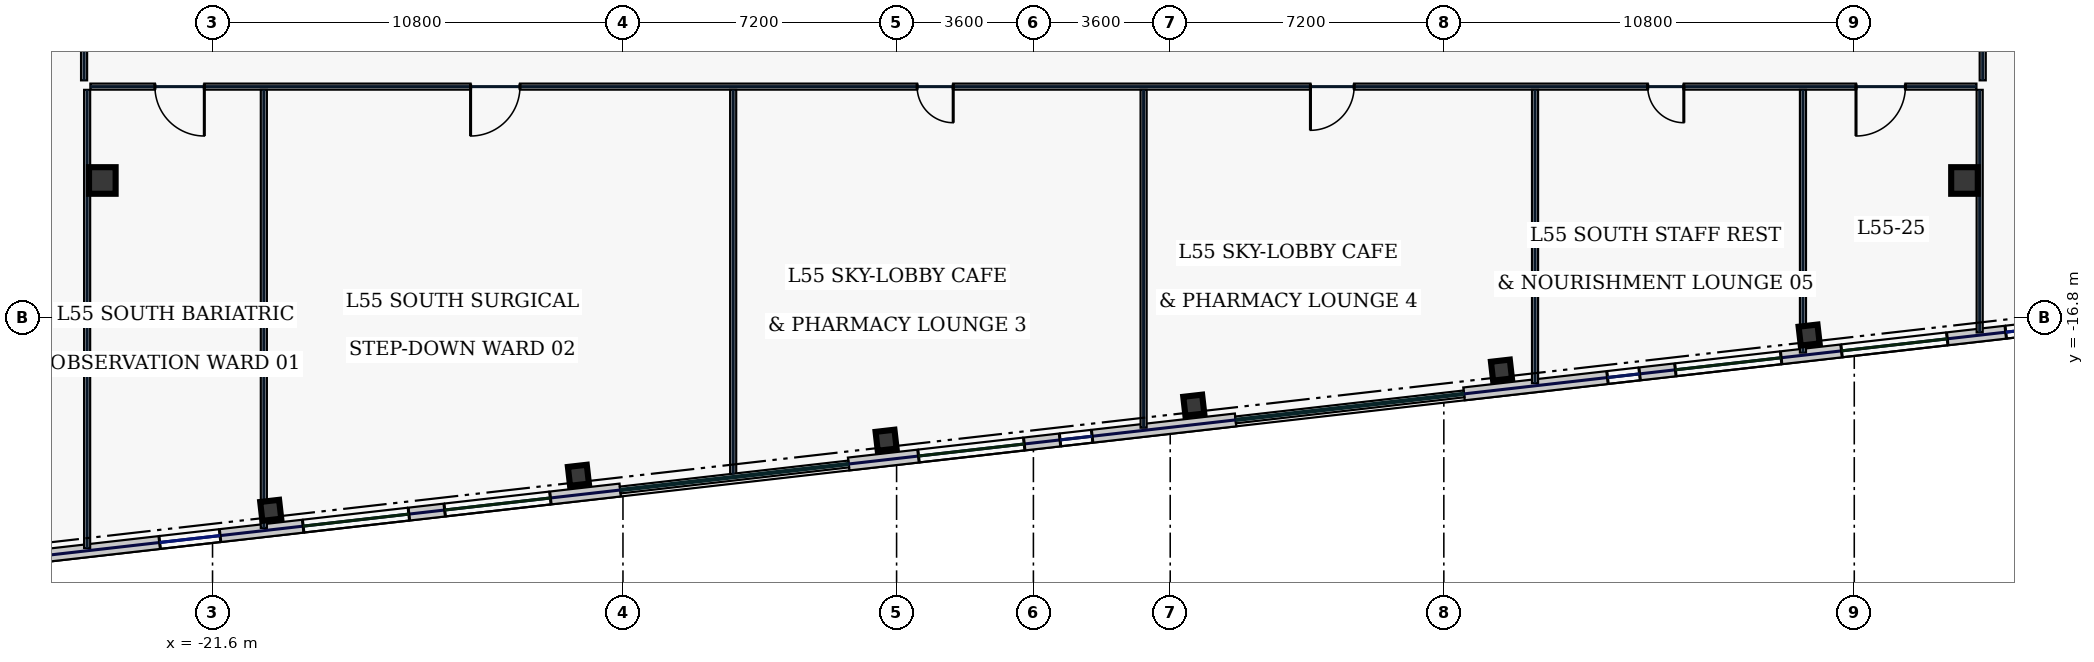
"""IFC4 building model, lengths in metres.
Left out: names, types, materials, properties, quantities, classifications, styles, units other than length and angle.
Written with IfcOpenShell. Run it as: python <this file> out.ifc"""

import sys

from ifc_helpers import new_model, si_unit, direction, frame, frame_2d, origin, origin_2d, place, context, subcontext, project, spatial, rectangle, hollow_rectangle, extrude, element, fill, save


model = new_model("IFC4")
c1 = context("Model", 3, precision=1e-05, world=origin(), true_north=direction((0.0, 1.0)))
c2 = subcontext(c1, "Body", "Model", "MODEL_VIEW")
j1 = project(units=[si_unit("LENGTHUNIT", "METRE"), si_unit("PLANEANGLEUNIT", "RADIAN")], contexts=[c1])
p1 = place(None, origin())
s1 = spatial("IfcSite", under=j1, at=p1, CompositionType="ELEMENT")
p2 = place(p1, origin())
s2 = spatial("IfcBuilding", under=s1, at=p2, CompositionType="ELEMENT")
p3 = place(p2, frame((0.0, 0.0, 238.2)))
s3 = spatial("IfcBuildingStorey", under=s2, at=p3, CompositionType="ELEMENT", Elevation=238.2)
for number, where, z_axis, x_axis in (
    (1, (-24.5, -13.2, 0.0), (0.0, 0.0, 1.0), (1.0, 0.0, 0.0)),
    (2, (24.5, -13.2, 0.0), (0.0, 0.0, 1.0), (1.0, 0.0, 0.0)),
):
    element("IfcColumn", number, at=place(p3, frame(where, z_axis=z_axis, x_axis=x_axis)), inside=s3, PredefinedType="COLUMN", context=c2, shape_type="SweptSolid", body=[
        extrude(hollow_rectangle(XDim=0.7, YDim=0.7, WallThickness=0.032, at=origin_2d()), origin(), (0.0, 0.0, 1.0), 4.54),
    ])
for number, where, z_axis, x_axis in (
    (3, (-20.069, -21.88, 0.0), (0.0, 0.0, 1.0), (0.994, 0.113, 0.0)),
    (4, (-11.972, -20.958, 0.0), (0.0, 0.0, 1.0), (0.994, 0.113, 0.0)),
    (5, (-3.876, -20.035, 0.0), (0.0, 0.0, 1.0), (0.994, 0.113, 0.0)),
    (6, (4.22, -19.113, 0.0), (0.0, 0.0, 1.0), (0.994, 0.113, 0.0)),
    (7, (12.316, -18.19, 0.0), (0.0, 0.0, 1.0), (0.994, 0.113, 0.0)),
    (8, (20.412, -17.268, 0.0), (0.0, 0.0, 1.0), (0.994, 0.113, 0.0)),
):
    element("IfcColumn", number, at=place(p3, frame(where, z_axis=z_axis, x_axis=x_axis)), inside=s3, PredefinedType="COLUMN", context=c2, shape_type="SweptSolid", body=[
        extrude(hollow_rectangle(XDim=0.5, YDim=0.5, WallThickness=0.025, at=origin_2d()), origin(), (0.0, 0.0, 1.0), 4.54),
    ])
p4 = place(p3, frame((-28.783, -23.386, 0.0), z_axis=(0.0, 0.0, 1.0), x_axis=(0.993571855431, 0.113203215925, 0.0)))
e9 = element("IfcWall", 9, at=p4, inside=s3, PredefinedType="STANDARD", context=c2, shape_type="SweptSolid", body=[
    extrude(rectangle(XDim=18.028, YDim=0.34, at=frame_2d((9.014, 0.0))), origin(), (0.0, 0.0, 1.0), 4.54),
])
p5 = place(p4, frame((1.48, 0.0, 0.9)))
e10 = element("IfcOpeningElement", 10, at=p5, cuts=e9, PredefinedType="OPENING", context=c2, shape_type="SweptSolid", body=[
    extrude(rectangle(XDim=0.85, YDim=1.85, at=frame_2d((0.425, 0.925))), frame((0.0, 0.18, 0.0), z_axis=(0.0, -1.0, 0.0), x_axis=(1.0, 0.0, 0.0)), (0.0, 0.0, 1.0), 0.36),
])
p6 = place(p4, frame((5.829, 0.0, 0.22)))
e11 = element("IfcOpeningElement", 11, at=p6, cuts=e9, PredefinedType="OPENING", context=c2, shape_type="SweptSolid", body=[
    extrude(rectangle(XDim=1.6, YDim=1.2, at=frame_2d((0.8, 0.6))), frame((0.0, 0.18, 0.0), z_axis=(0.0, -1.0, 0.0), x_axis=(1.0, 0.0, 0.0)), (0.0, 0.0, 1.0), 0.36),
])
p7 = place(p4, frame((9.629, 0.0, 0.9)))
e12 = element("IfcOpeningElement", 12, at=p7, cuts=e9, PredefinedType="OPENING", context=c2, shape_type="SweptSolid", body=[
    extrude(rectangle(XDim=2.8, YDim=1.95, at=frame_2d((1.4, 0.975))), frame((0.0, 0.18, 0.0), z_axis=(0.0, -1.0, 0.0), x_axis=(1.0, 0.0, 0.0)), (0.0, 0.0, 1.0), 0.36),
])
p8 = place(p4, frame((13.377, 0.0, 0.9)))
e13 = element("IfcOpeningElement", 13, at=p8, cuts=e9, PredefinedType="OPENING", context=c2, shape_type="SweptSolid", body=[
    extrude(rectangle(XDim=2.8, YDim=1.95, at=frame_2d((1.4, 0.975))), frame((0.0, 0.18, 0.0), z_axis=(0.0, -1.0, 0.0), x_axis=(1.0, 0.0, 0.0)), (0.0, 0.0, 1.0), 0.36),
])
p9 = place(p3, frame((-4.862, -20.661, 0.0), z_axis=(0.0, 0.0, 1.0), x_axis=(0.993570162731, 0.113218071575, 0.0)))
e14 = element("IfcWall", 14, at=p9, inside=s3, PredefinedType="STANDARD", context=c2, shape_type="SweptSolid", body=[
    extrude(rectangle(XDim=10.249, YDim=0.34, at=frame_2d((5.125, 0.0))), origin(), (0.0, 0.0, 1.0), 4.54),
])
p10 = place(p9, frame((1.85, 0.0, 0.9)))
e15 = element("IfcOpeningElement", 15, at=p10, cuts=e14, PredefinedType="OPENING", context=c2, shape_type="SweptSolid", body=[
    extrude(rectangle(XDim=2.8, YDim=1.95, at=frame_2d((1.4, 0.975))), frame((0.0, 0.18, 0.0), z_axis=(0.0, -1.0, 0.0), x_axis=(1.0, 0.0, 0.0)), (0.0, 0.0, 1.0), 0.36),
])
p11 = place(p9, frame((5.599, 0.0, 0.9)))
e16 = element("IfcOpeningElement", 16, at=p11, cuts=e14, PredefinedType="OPENING", context=c2, shape_type="SweptSolid", body=[
    extrude(rectangle(XDim=0.85, YDim=1.85, at=frame_2d((0.425, 0.925))), frame((0.0, 0.18, 0.0), z_axis=(0.0, -1.0, 0.0), x_axis=(1.0, 0.0, 0.0)), (0.0, 0.0, 1.0), 0.36),
])
p12 = place(p3, frame((11.331, -18.816, 0.0), z_axis=(0.0, 0.0, 1.0), x_axis=(0.993571681878, 0.113204739165, 0.0)))
e17 = element("IfcWall", 17, at=p12, inside=s3, PredefinedType="STANDARD", context=c2, shape_type="SweptSolid", body=[
    extrude(rectangle(XDim=18.027, YDim=0.34, at=frame_2d((9.014, 0.0))), origin(), (0.0, 0.0, 1.0), 4.54),
])
p13 = place(p12, frame((3.8, 0.0, 0.9)))
e18 = element("IfcOpeningElement", 18, at=p13, cuts=e17, PredefinedType="OPENING", context=c2, shape_type="SweptSolid", body=[
    extrude(rectangle(XDim=0.85, YDim=1.85, at=frame_2d((0.425, 0.925))), frame((0.0, 0.18, 0.0), z_axis=(0.0, -1.0, 0.0), x_axis=(1.0, 0.0, 0.0)), (0.0, 0.0, 1.0), 0.36),
])
p14 = place(p12, frame((5.599, 0.0, 0.9)))
e19 = element("IfcOpeningElement", 19, at=p14, cuts=e17, PredefinedType="OPENING", context=c2, shape_type="SweptSolid", body=[
    extrude(rectangle(XDim=2.8, YDim=1.95, at=frame_2d((1.4, 0.975))), frame((0.0, 0.18, 0.0), z_axis=(0.0, -1.0, 0.0), x_axis=(1.0, 0.0, 0.0)), (0.0, 0.0, 1.0), 0.36),
])
p15 = place(p12, frame((9.999, 0.0, 0.9)))
e20 = element("IfcOpeningElement", 20, at=p15, cuts=e17, PredefinedType="OPENING", context=c2, shape_type="SweptSolid", body=[
    extrude(rectangle(XDim=2.8, YDim=1.95, at=frame_2d((1.4, 0.975))), frame((0.0, 0.18, 0.0), z_axis=(0.0, -1.0, 0.0), x_axis=(1.0, 0.0, 0.0)), (0.0, 0.0, 1.0), 0.36),
])
p16 = place(p12, frame((14.347, 0.0, 0.22)))
e21 = element("IfcOpeningElement", 21, at=p16, cuts=e17, PredefinedType="OPENING", context=c2, shape_type="SweptSolid", body=[
    extrude(rectangle(XDim=1.6, YDim=1.2, at=frame_2d((0.8, 0.6))), frame((0.0, 0.18, 0.0), z_axis=(0.0, -1.0, 0.0), x_axis=(1.0, 0.0, 0.0)), (0.0, 0.0, 1.0), 0.36),
])
p17 = place(p3, frame((-24.98, -10.565, 0.0), z_axis=(0.0, 0.0, 1.0), x_axis=(0.0, 1.0, 0.0)))
e22 = element("IfcWall", 22, at=p17, inside=s3, PredefinedType="PARTITIONING", context=c2, shape_type="SweptSolid", body=[
    extrude(rectangle(XDim=2.98, YDim=0.16, at=frame_2d((1.49, 0.0))), origin(), (0.0, 0.0, 1.0), 4.54),
])
p18 = place(p17, frame((1.1, 0.0, 0.0)))
e23 = element("IfcOpeningElement", 23, at=p18, cuts=e22, PredefinedType="OPENING", context=c2, shape_type="SweptSolid", body=[
    extrude(rectangle(XDim=0.95, YDim=2.2, at=frame_2d((0.475, 1.1))), frame((0.0, 0.09, 0.0), z_axis=(0.0, -1.0, 0.0), x_axis=(1.0, 0.0, 0.0)), (0.0, 0.0, 1.0), 0.18),
])
p19 = place(p3, frame((24.98, -7.585, 0.0), z_axis=(0.0, 0.0, 1.0), x_axis=(0.0, -1.0, 0.0)))
e24 = element("IfcWall", 24, at=p19, inside=s3, PredefinedType="PARTITIONING", context=c2, shape_type="SweptSolid", body=[
    extrude(rectangle(XDim=2.98, YDim=0.16, at=frame_2d((1.49, 0.0))), origin(), (0.0, 0.0, 1.0), 4.54),
])
p20 = place(p19, frame((1.1, 0.0, 0.0)))
e25 = element("IfcOpeningElement", 25, at=p20, cuts=e24, PredefinedType="OPENING", context=c2, shape_type="SweptSolid", body=[
    extrude(rectangle(XDim=0.95, YDim=2.2, at=frame_2d((0.475, 1.1))), frame((0.0, 0.09, 0.0), z_axis=(0.0, -1.0, 0.0), x_axis=(1.0, 0.0, 0.0)), (0.0, 0.0, 1.0), 0.18),
])
p21 = place(p3, frame((24.815, -10.73, 0.0), z_axis=(0.0, 0.0, 1.0), x_axis=(-1.0, 0.0, 0.0)))
e26 = element("IfcWall", 26, at=p21, inside=s3, PredefinedType="PARTITIONING", context=c2, shape_type="SweptSolid", body=[
    extrude(rectangle(XDim=49.63, YDim=0.16, at=frame_2d((24.815, 0.0))), origin(), (0.0, 0.0, 1.0), 4.54),
])
p22 = place(p21, frame((46.631, 0.0, 0.0)))
e27 = element("IfcOpeningElement", 27, at=p22, cuts=e26, PredefinedType="OPENING", context=c2, shape_type="SweptSolid", body=[
    extrude(rectangle(XDim=1.3, YDim=2.2, at=frame_2d((0.65, 1.1))), frame((0.0, 0.09, 0.0), z_axis=(0.0, -1.0, 0.0), x_axis=(1.0, 0.0, 0.0)), (0.0, 0.0, 1.0), 0.18),
])
p23 = place(p21, frame((38.325, 0.0, 0.0)))
e28 = element("IfcOpeningElement", 28, at=p23, cuts=e26, PredefinedType="OPENING", context=c2, shape_type="SweptSolid", body=[
    extrude(rectangle(XDim=1.3, YDim=2.2, at=frame_2d((0.65, 1.1))), frame((0.0, 0.09, 0.0), z_axis=(0.0, -1.0, 0.0), x_axis=(1.0, 0.0, 0.0)), (0.0, 0.0, 1.0), 0.18),
])
p24 = place(p21, frame((26.925, 0.0, 0.0)))
e29 = element("IfcOpeningElement", 29, at=p24, cuts=e26, PredefinedType="OPENING", context=c2, shape_type="SweptSolid", body=[
    extrude(rectangle(XDim=0.95, YDim=2.2, at=frame_2d((0.475, 1.1))), frame((0.0, 0.09, 0.0), z_axis=(0.0, -1.0, 0.0), x_axis=(1.0, 0.0, 0.0)), (0.0, 0.0, 1.0), 0.18),
])
p25 = place(p21, frame((16.375, 0.0, 0.0)))
e30 = element("IfcOpeningElement", 30, at=p25, cuts=e26, PredefinedType="OPENING", context=c2, shape_type="SweptSolid", body=[
    extrude(rectangle(XDim=1.15, YDim=2.2, at=frame_2d((0.575, 1.1))), frame((0.0, 0.09, 0.0), z_axis=(0.0, -1.0, 0.0), x_axis=(1.0, 0.0, 0.0)), (0.0, 0.0, 1.0), 0.18),
])
p26 = place(p21, frame((7.7, 0.0, 0.0)))
e31 = element("IfcOpeningElement", 31, at=p26, cuts=e26, PredefinedType="OPENING", context=c2, shape_type="SweptSolid", body=[
    extrude(rectangle(XDim=0.95, YDim=2.2, at=frame_2d((0.475, 1.1))), frame((0.0, 0.09, 0.0), z_axis=(0.0, -1.0, 0.0), x_axis=(1.0, 0.0, 0.0)), (0.0, 0.0, 1.0), 0.18),
])
p27 = place(p21, frame((1.869, 0.0, 0.0)))
e32 = element("IfcOpeningElement", 32, at=p27, cuts=e26, PredefinedType="OPENING", context=c2, shape_type="SweptSolid", body=[
    extrude(rectangle(XDim=1.3, YDim=2.2, at=frame_2d((0.65, 1.1))), frame((0.0, 0.09, 0.0), z_axis=(0.0, -1.0, 0.0), x_axis=(1.0, 0.0, 0.0)), (0.0, 0.0, 1.0), 0.18),
])
p28 = place(p3, frame((-24.9, -22.873, 0.0), z_axis=(0.0, 0.0, 1.0), x_axis=(0.0, 1.0, 0.0)))
e33 = element("IfcWall", 33, at=p28, inside=s3, PredefinedType="PARTITIONING", context=c2, shape_type="SweptSolid", body=[
    extrude(rectangle(XDim=12.058, YDim=0.16, at=frame_2d((6.029, 0.0))), origin(), (0.0, 0.0, 1.0), 4.54),
])
p29 = place(p3, frame((24.9, -17.199, 0.0), z_axis=(0.0, 0.0, 1.0), x_axis=(0.0, 1.0, 0.0)))
e34 = element("IfcWall", 34, at=p29, inside=s3, PredefinedType="PARTITIONING", context=c2, shape_type="SweptSolid", body=[
    extrude(rectangle(XDim=6.385, YDim=0.16, at=frame_2d((3.192, 0.0))), origin(), (0.0, 0.0, 1.0), 4.54),
])
p30 = place(p3, frame((-20.25, -22.344, 0.0), z_axis=(0.0, 0.0, 1.0), x_axis=(0.0, 1.0, 0.0)))
e35 = element("IfcWall", 35, at=p30, inside=s3, PredefinedType="PARTITIONING", context=c2, shape_type="SweptSolid", body=[
    extrude(rectangle(XDim=11.529, YDim=0.16, at=frame_2d((5.764, 0.0))), origin(), (0.0, 0.0, 1.0), 4.54),
])
p31 = place(p3, frame((-7.9, -20.937, 0.0), z_axis=(0.0, 0.0, 1.0), x_axis=(0.0, 1.0, 0.0)))
e36 = element("IfcWall", 36, at=p31, inside=s3, PredefinedType="PARTITIONING", context=c2, shape_type="SweptSolid", body=[
    extrude(rectangle(XDim=10.122, YDim=0.16, at=frame_2d((5.061, 0.0))), origin(), (0.0, 0.0, 1.0), 4.54),
])
p32 = place(p3, frame((2.9, -19.706, 0.0), z_axis=(0.0, 0.0, 1.0), x_axis=(0.0, 1.0, 0.0)))
e37 = element("IfcWall", 37, at=p32, inside=s3, PredefinedType="PARTITIONING", context=c2, shape_type="SweptSolid", body=[
    extrude(rectangle(XDim=8.891, YDim=0.16, at=frame_2d((4.446, 0.0))), origin(), (0.0, 0.0, 1.0), 4.54),
])
p33 = place(p3, frame((13.2, -18.532, 0.0), z_axis=(0.0, 0.0, 1.0), x_axis=(0.0, 1.0, 0.0)))
e38 = element("IfcWall", 38, at=p33, inside=s3, PredefinedType="PARTITIONING", context=c2, shape_type="SweptSolid", body=[
    extrude(rectangle(XDim=7.718, YDim=0.16, at=frame_2d((3.859, 0.0))), origin(), (0.0, 0.0, 1.0), 4.54),
])
p34 = place(p3, frame((20.25, -17.729, 0.0), z_axis=(0.0, 0.0, 1.0), x_axis=(0.0, 1.0, 0.0)))
e39 = element("IfcWall", 39, at=p34, inside=s3, PredefinedType="PARTITIONING", context=c2, shape_type="SweptSolid", body=[
    extrude(rectangle(XDim=6.914, YDim=0.16, at=frame_2d((3.457, 0.0))), origin(), (0.0, 0.0, 1.0), 4.54),
])
p35 = place(p6, origin())
e40 = element("IfcWindow", 40, at=p35, inside=s3, PartitioningType="SINGLE_PANEL", PredefinedType="WINDOW", context=c2, shape_type="SweptSolid", body=[
    extrude(rectangle(XDim=1.6, YDim=1.2, at=frame_2d((0.8, 0.6))), frame((0.0, 0.03, 0.0), z_axis=(0.0, -1.0, 0.0), x_axis=(1.0, 0.0, 0.0)), (0.0, 0.0, 1.0), 0.06),
])
fill(e11, e40)
p36 = place(p7, origin())
e41 = element("IfcWindow", 41, at=p36, inside=s3, PartitioningType="SINGLE_PANEL", PredefinedType="WINDOW", context=c2, shape_type="SweptSolid", body=[
    extrude(rectangle(XDim=2.8, YDim=1.95, at=frame_2d((1.4, 0.975))), frame((0.0, 0.03, 0.0), z_axis=(0.0, -1.0, 0.0), x_axis=(1.0, 0.0, 0.0)), (0.0, 0.0, 1.0), 0.06),
])
fill(e12, e41)
p37 = place(p8, origin())
e42 = element("IfcWindow", 42, at=p37, inside=s3, PartitioningType="SINGLE_PANEL", PredefinedType="WINDOW", context=c2, shape_type="SweptSolid", body=[
    extrude(rectangle(XDim=2.8, YDim=1.95, at=frame_2d((1.4, 0.975))), frame((0.0, 0.03, 0.0), z_axis=(0.0, -1.0, 0.0), x_axis=(1.0, 0.0, 0.0)), (0.0, 0.0, 1.0), 0.06),
])
fill(e13, e42)
p38 = place(p10, origin())
e43 = element("IfcWindow", 43, at=p38, inside=s3, PartitioningType="SINGLE_PANEL", PredefinedType="WINDOW", context=c2, shape_type="SweptSolid", body=[
    extrude(rectangle(XDim=2.8, YDim=1.95, at=frame_2d((1.4, 0.975))), frame((0.0, 0.03, 0.0), z_axis=(0.0, -1.0, 0.0), x_axis=(1.0, 0.0, 0.0)), (0.0, 0.0, 1.0), 0.06),
])
fill(e15, e43)
p39 = place(p11, origin())
e44 = element("IfcWindow", 44, at=p39, inside=s3, PartitioningType="SINGLE_PANEL", PredefinedType="WINDOW", context=c2, shape_type="SweptSolid", body=[
    extrude(rectangle(XDim=0.85, YDim=1.85, at=frame_2d((0.425, 0.925))), frame((0.0, 0.03, 0.0), z_axis=(0.0, -1.0, 0.0), x_axis=(1.0, 0.0, 0.0)), (0.0, 0.0, 1.0), 0.06),
])
fill(e16, e44)
p40 = place(p13, origin())
e45 = element("IfcWindow", 45, at=p40, inside=s3, PartitioningType="SINGLE_PANEL", PredefinedType="WINDOW", context=c2, shape_type="SweptSolid", body=[
    extrude(rectangle(XDim=0.85, YDim=1.85, at=frame_2d((0.425, 0.925))), frame((0.0, 0.03, 0.0), z_axis=(0.0, -1.0, 0.0), x_axis=(1.0, 0.0, 0.0)), (0.0, 0.0, 1.0), 0.06),
])
fill(e18, e45)
p41 = place(p14, origin())
e46 = element("IfcWindow", 46, at=p41, inside=s3, PartitioningType="SINGLE_PANEL", PredefinedType="WINDOW", context=c2, shape_type="SweptSolid", body=[
    extrude(rectangle(XDim=2.8, YDim=1.95, at=frame_2d((1.4, 0.975))), frame((0.0, 0.03, 0.0), z_axis=(0.0, -1.0, 0.0), x_axis=(1.0, 0.0, 0.0)), (0.0, 0.0, 1.0), 0.06),
])
fill(e19, e46)
p42 = place(p15, origin())
e47 = element("IfcWindow", 47, at=p42, inside=s3, PartitioningType="SINGLE_PANEL", PredefinedType="WINDOW", context=c2, shape_type="SweptSolid", body=[
    extrude(rectangle(XDim=2.8, YDim=1.95, at=frame_2d((1.4, 0.975))), frame((0.0, 0.03, 0.0), z_axis=(0.0, -1.0, 0.0), x_axis=(1.0, 0.0, 0.0)), (0.0, 0.0, 1.0), 0.06),
])
fill(e20, e47)
p43 = place(p16, origin())
e48 = element("IfcWindow", 48, at=p43, inside=s3, PartitioningType="SINGLE_PANEL", PredefinedType="WINDOW", context=c2, shape_type="SweptSolid", body=[
    extrude(rectangle(XDim=1.6, YDim=1.2, at=frame_2d((0.8, 0.6))), frame((0.0, 0.03, 0.0), z_axis=(0.0, -1.0, 0.0), x_axis=(1.0, 0.0, 0.0)), (0.0, 0.0, 1.0), 0.06),
])
fill(e21, e48)
p44 = place(p22, origin())
e49 = element("IfcDoor", 49, at=p44, inside=s3, OperationType="SINGLE_SWING_LEFT", PredefinedType="DOOR", context=c2, shape_type="SweptSolid", body=[
    extrude(rectangle(XDim=1.3, YDim=2.2, at=frame_2d((0.65, 1.1))), frame((0.0, 0.025, 0.0), z_axis=(0.0, -1.0, 0.0), x_axis=(1.0, 0.0, 0.0)), (0.0, 0.0, 1.0), 0.05),
])
fill(e27, e49)
p45 = place(p23, origin())
e50 = element("IfcDoor", 50, at=p45, inside=s3, OperationType="SINGLE_SWING_RIGHT", PredefinedType="DOOR", context=c2, shape_type="SweptSolid", body=[
    extrude(rectangle(XDim=1.3, YDim=2.2, at=frame_2d((0.65, 1.1))), frame((0.0, 0.025, 0.0), z_axis=(0.0, -1.0, 0.0), x_axis=(1.0, 0.0, 0.0)), (0.0, 0.0, 1.0), 0.05),
])
fill(e28, e50)
p46 = place(p24, origin())
e51 = element("IfcDoor", 51, at=p46, inside=s3, OperationType="SINGLE_SWING_LEFT", PredefinedType="DOOR", context=c2, shape_type="SweptSolid", body=[
    extrude(rectangle(XDim=0.95, YDim=2.2, at=frame_2d((0.475, 1.1))), frame((0.0, 0.025, 0.0), z_axis=(0.0, -1.0, 0.0), x_axis=(1.0, 0.0, 0.0)), (0.0, 0.0, 1.0), 0.05),
])
fill(e29, e51)
p47 = place(p25, origin())
e52 = element("IfcDoor", 52, at=p47, inside=s3, OperationType="SINGLE_SWING_RIGHT", PredefinedType="DOOR", context=c2, shape_type="SweptSolid", body=[
    extrude(rectangle(XDim=1.15, YDim=2.2, at=frame_2d((0.575, 1.1))), frame((0.0, 0.025, 0.0), z_axis=(0.0, -1.0, 0.0), x_axis=(1.0, 0.0, 0.0)), (0.0, 0.0, 1.0), 0.05),
])
fill(e30, e52)
p48 = place(p26, origin())
e53 = element("IfcDoor", 53, at=p48, inside=s3, OperationType="SINGLE_SWING_LEFT", PredefinedType="DOOR", context=c2, shape_type="SweptSolid", body=[
    extrude(rectangle(XDim=0.95, YDim=2.2, at=frame_2d((0.475, 1.1))), frame((0.0, 0.025, 0.0), z_axis=(0.0, -1.0, 0.0), x_axis=(1.0, 0.0, 0.0)), (0.0, 0.0, 1.0), 0.05),
])
fill(e31, e53)
p49 = place(p27, origin())
e54 = element("IfcDoor", 54, at=p49, inside=s3, OperationType="SINGLE_SWING_RIGHT", PredefinedType="DOOR", context=c2, shape_type="SweptSolid", body=[
    extrude(rectangle(XDim=1.3, YDim=2.2, at=frame_2d((0.65, 1.1))), frame((0.0, 0.025, 0.0), z_axis=(0.0, -1.0, 0.0), x_axis=(1.0, 0.0, 0.0)), (0.0, 0.0, 1.0), 0.05),
])
fill(e32, e54)
save(model, sys.argv[1])
